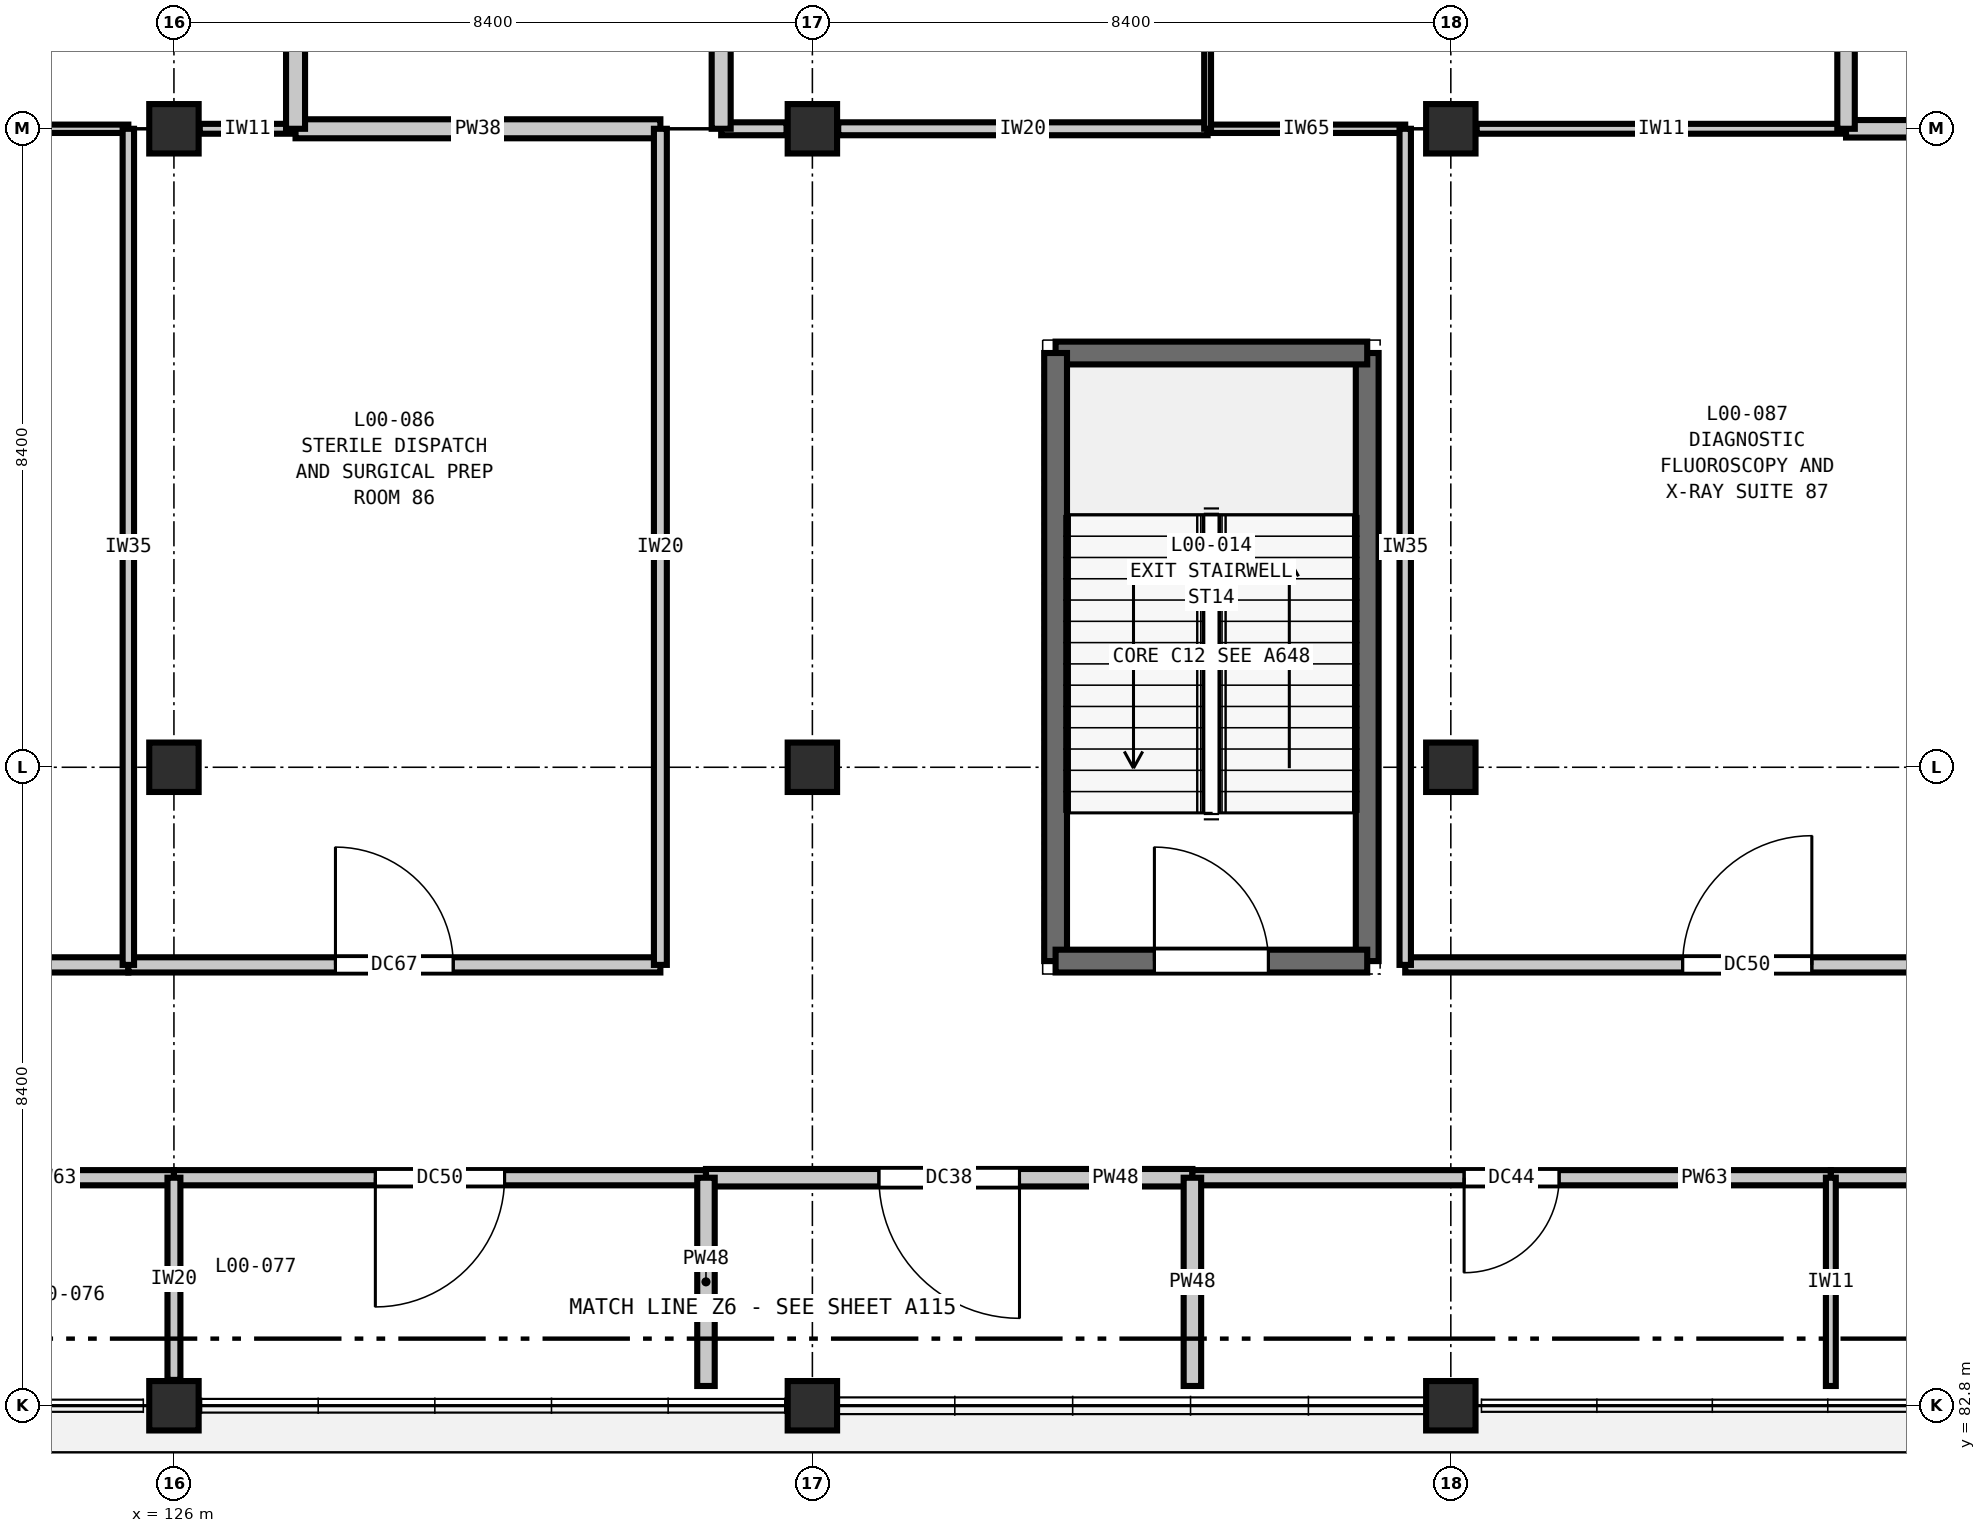
"""IFC4 building model, lengths in metres.
Left out: names, types, materials, properties, quantities, classifications, styles, units other than length and angle.
Written with IfcOpenShell. Run it as: python <this file> out.ifc"""

import sys

from ifc_helpers import new_model, si_unit, direction, frame, frame_2d, origin, origin_2d, place, context, subcontext, project, spatial, rectangle, extrude, element, fill, save


model = new_model("IFC4")
c1 = context("Model", 3, precision=1e-05, world=origin(), true_north=direction((0.0, 1.0)))
c2 = subcontext(c1, "Body", "Model", "MODEL_VIEW")
j1 = project(units=[si_unit("LENGTHUNIT", "METRE"), si_unit("PLANEANGLEUNIT", "RADIAN")], contexts=[c1])
p1 = place(None, origin())
s1 = spatial("IfcSite", under=j1, at=p1, CompositionType="ELEMENT")
p2 = place(p1, origin())
s2 = spatial("IfcBuilding", under=s1, at=p2, CompositionType="ELEMENT")
p3 = place(p2, origin())
s3 = spatial("IfcBuildingStorey", under=s2, at=p3, CompositionType="ELEMENT", Elevation=0.0)
for number, where, z_axis, x_axis in (
    (1, (126.0, 82.8, 0.0), (0.0, 0.0, 1.0), (1.0, 0.0, 0.0)),
    (2, (126.0, 91.2, 0.0), (0.0, 0.0, 1.0), (1.0, 0.0, 0.0)),
    (3, (126.0, 99.6, 0.0), (0.0, 0.0, 1.0), (1.0, 0.0, 0.0)),
    (4, (134.4, 82.8, 0.0), (0.0, 0.0, 1.0), (1.0, 0.0, 0.0)),
    (5, (134.4, 91.2, 0.0), (0.0, 0.0, 1.0), (1.0, 0.0, 0.0)),
    (6, (134.4, 99.6, 0.0), (0.0, 0.0, 1.0), (1.0, 0.0, 0.0)),
    (7, (142.8, 82.8, 0.0), (0.0, 0.0, 1.0), (1.0, 0.0, 0.0)),
    (8, (142.8, 91.2, 0.0), (0.0, 0.0, 1.0), (1.0, 0.0, 0.0)),
    (9, (142.8, 99.6, 0.0), (0.0, 0.0, 1.0), (1.0, 0.0, 0.0)),
):
    element("IfcColumn", number, at=place(p3, frame(where, z_axis=z_axis, x_axis=x_axis)), inside=s3, PredefinedType="COLUMN", context=c2, shape_type="SweptSolid", body=[
        extrude(rectangle(XDim=0.65, YDim=0.65, at=origin_2d()), origin(), (0.0, 0.0, 1.0), 5.4),
    ])
p4 = place(p3, frame((141.7, 88.65, 0.0), z_axis=(0.0, 0.0, 1.0), x_axis=(0.0, 1.0, 0.0)))
e10 = element("IfcWall", 10, at=p4, inside=s3, PredefinedType="SHEAR", context=c2, shape_type="SweptSolid", body=[
    extrude(rectangle(XDim=8.0, YDim=0.3, at=frame_2d((4.0, 0.0))), origin(), (0.0, 0.0, 1.0), 5.4),
])
p5 = place(p3, frame((141.7, 96.65, 0.0), z_axis=(0.0, 0.0, 1.0), x_axis=(-1.0, 0.0, 0.0)))
e11 = element("IfcWall", 11, at=p5, inside=s3, PredefinedType="SHEAR", context=c2, shape_type="SweptSolid", body=[
    extrude(rectangle(XDim=4.1, YDim=0.3, at=frame_2d((2.05, 0.0))), origin(), (0.0, 0.0, 1.0), 5.4),
])
p6 = place(p3, frame((137.6, 96.65, 0.0), z_axis=(0.0, 0.0, 1.0), x_axis=(0.0, -1.0, 0.0)))
e12 = element("IfcWall", 12, at=p6, inside=s3, PredefinedType="SHEAR", context=c2, shape_type="SweptSolid", body=[
    extrude(rectangle(XDim=8.0, YDim=0.3, at=frame_2d((4.0, 0.0))), origin(), (0.0, 0.0, 1.0), 5.4),
])
p7 = place(p3, frame((137.6, 88.65, 0.0), z_axis=(0.0, 0.0, 1.0), x_axis=(1.0, 0.0, 0.0)))
e13 = element("IfcWall", 13, at=p7, inside=s3, PredefinedType="SHEAR", context=c2, shape_type="SweptSolid", body=[
    extrude(rectangle(XDim=4.1, YDim=0.3, at=frame_2d((2.05, 0.0))), origin(), (0.0, 0.0, 1.0), 5.4),
])
p8 = place(p7, frame((1.3, 0.0, 0.0)))
e14 = element("IfcOpeningElement", 14, at=p8, cuts=e13, PredefinedType="OPENING", context=c2, shape_type="SweptSolid", body=[
    extrude(rectangle(XDim=1.5, YDim=2.2, at=frame_2d((0.75, 1.1))), frame((0.0, 0.16, 0.0), z_axis=(0.0, -1.0, 0.0), x_axis=(1.0, 0.0, 0.0)), (0.0, 0.0, 1.0), 0.32),
])
p9 = place(p3, frame((117.6, 85.8, 0.0), z_axis=(0.0, 0.0, 1.0), x_axis=(1.0, 0.0, 0.0)))
e15 = element("IfcWall", 15, at=p9, inside=s3, PredefinedType="PARTITIONING", context=c2, shape_type="SweptSolid", body=[
    extrude(rectangle(XDim=8.4, YDim=0.2, at=frame_2d((4.2, 0.0))), origin(), (0.0, 0.0, 1.0), 5.04),
])
p10 = place(p9, frame((3.425, 0.0, 0.0)))
e16 = element("IfcOpeningElement", 16, at=p10, cuts=e15, PredefinedType="OPENING", context=c2, shape_type="SweptSolid", body=[
    extrude(rectangle(XDim=1.55, YDim=2.25, at=frame_2d((0.775, 1.125))), frame((0.0, 0.11, 0.0), z_axis=(0.0, -1.0, 0.0), x_axis=(1.0, 0.0, 0.0)), (0.0, 0.0, 1.0), 0.22),
])
p11 = place(p3, frame((126.0, 85.8, 0.0), z_axis=(0.0, 0.0, 1.0), x_axis=(1.0, 0.0, 0.0)))
e17 = element("IfcWall", 17, at=p11, inside=s3, PredefinedType="PARTITIONING", context=c2, shape_type="SweptSolid", body=[
    extrude(rectangle(XDim=7.0, YDim=0.2, at=frame_2d((3.5, 0.0))), origin(), (0.0, 0.0, 1.0), 5.04),
])
p12 = place(p11, frame((2.65, 0.0, 0.0)))
e18 = element("IfcOpeningElement", 18, at=p12, cuts=e17, PredefinedType="OPENING", context=c2, shape_type="SweptSolid", body=[
    extrude(rectangle(XDim=1.7, YDim=2.3, at=frame_2d((0.85, 1.15))), frame((0.0, 0.11, 0.0), z_axis=(0.0, -1.0, 0.0), x_axis=(1.0, 0.0, 0.0)), (0.0, 0.0, 1.0), 0.22),
])
p13 = place(p3, frame((133.0, 85.8, 0.0), z_axis=(0.0, 0.0, 1.0), x_axis=(1.0, 0.0, 0.0)))
e19 = element("IfcWall", 19, at=p13, inside=s3, PredefinedType="PARTITIONING", context=c2, shape_type="SweptSolid", body=[
    extrude(rectangle(XDim=6.4, YDim=0.23, at=frame_2d((3.2, 0.0))), origin(), (0.0, 0.0, 1.0), 5.04),
])
p14 = place(p13, frame((2.275, 0.0, 0.0)))
e20 = element("IfcOpeningElement", 20, at=p14, cuts=e19, PredefinedType="OPENING", context=c2, shape_type="SweptSolid", body=[
    extrude(rectangle(XDim=1.85, YDim=2.3, at=frame_2d((0.925, 1.15))), frame((0.0, 0.125, 0.0), z_axis=(0.0, -1.0, 0.0), x_axis=(1.0, 0.0, 0.0)), (0.0, 0.0, 1.0), 0.25),
])
p15 = place(p3, frame((139.4, 85.8, 0.0), z_axis=(0.0, 0.0, 1.0), x_axis=(1.0, 0.0, 0.0)))
e21 = element("IfcWall", 21, at=p15, inside=s3, PredefinedType="PARTITIONING", context=c2, shape_type="SweptSolid", body=[
    extrude(rectangle(XDim=8.4, YDim=0.2, at=frame_2d((4.2, 0.0))), origin(), (0.0, 0.0, 1.0), 5.04),
])
p16 = place(p15, frame((3.575, 0.0, 0.0)))
e22 = element("IfcOpeningElement", 22, at=p16, cuts=e21, PredefinedType="OPENING", context=c2, shape_type="SweptSolid", body=[
    extrude(rectangle(XDim=1.25, YDim=2.15, at=frame_2d((0.625, 1.075))), frame((0.0, 0.11, 0.0), z_axis=(0.0, -1.0, 0.0), x_axis=(1.0, 0.0, 0.0)), (0.0, 0.0, 1.0), 0.22),
])
p17 = place(p3, frame((147.8, 85.8, 0.0), z_axis=(0.0, 0.0, 1.0), x_axis=(1.0, 0.0, 0.0)))
e23 = element("IfcWall", 23, at=p17, inside=s3, PredefinedType="PARTITIONING", context=c2, shape_type="SweptSolid", body=[
    extrude(rectangle(XDim=3.4, YDim=0.2, at=frame_2d((1.7, 0.0))), origin(), (0.0, 0.0, 1.0), 5.04),
])
p18 = place(p17, frame((1.05, 0.0, 0.0)))
e24 = element("IfcOpeningElement", 24, at=p18, cuts=e23, PredefinedType="OPENING", context=c2, shape_type="SweptSolid", body=[
    extrude(rectangle(XDim=1.3, YDim=2.2, at=frame_2d((0.65, 1.1))), frame((0.0, 0.11, 0.0), z_axis=(0.0, -1.0, 0.0), x_axis=(1.0, 0.0, 0.0)), (0.0, 0.0, 1.0), 0.22),
])
p19 = place(p3, frame((117.135, 88.6, 0.0), z_axis=(0.0, 0.0, 1.0), x_axis=(1.0, 0.0, 0.0)))
e25 = element("IfcWall", 25, at=p19, inside=s3, PredefinedType="PARTITIONING", context=c2, shape_type="SweptSolid", body=[
    extrude(rectangle(XDim=8.265, YDim=0.2, at=frame_2d((4.133, 0.0))), origin(), (0.0, 0.0, 1.0), 5.04),
])
p20 = place(p19, frame((3.408, 0.0, 0.0)))
e26 = element("IfcOpeningElement", 26, at=p20, cuts=e25, PredefinedType="OPENING", context=c2, shape_type="SweptSolid", body=[
    extrude(rectangle(XDim=1.45, YDim=2.25, at=frame_2d((0.725, 1.125))), frame((0.0, 0.11, 0.0), z_axis=(0.0, -1.0, 0.0), x_axis=(1.0, 0.0, 0.0)), (0.0, 0.0, 1.0), 0.22),
])
p21 = place(p3, frame((125.4, 88.6, 0.0), z_axis=(0.0, 0.0, 1.0), x_axis=(1.0, 0.0, 0.0)))
e27 = element("IfcWall", 27, at=p21, inside=s3, PredefinedType="PARTITIONING", context=c2, shape_type="SweptSolid", body=[
    extrude(rectangle(XDim=7.0, YDim=0.2, at=frame_2d((3.5, 0.0))), origin(), (0.0, 0.0, 1.0), 5.04),
])
p22 = place(p21, frame((2.725, 0.0, 0.0)))
e28 = element("IfcOpeningElement", 28, at=p22, cuts=e27, PredefinedType="OPENING", context=c2, shape_type="SweptSolid", body=[
    extrude(rectangle(XDim=1.55, YDim=2.25, at=frame_2d((0.775, 1.125))), frame((0.0, 0.11, 0.0), z_axis=(0.0, -1.0, 0.0), x_axis=(1.0, 0.0, 0.0)), (0.0, 0.0, 1.0), 0.22),
])
p23 = place(p3, frame((142.2, 88.6, 0.0), z_axis=(0.0, 0.0, 1.0), x_axis=(1.0, 0.0, 0.0)))
e29 = element("IfcWall", 29, at=p23, inside=s3, PredefinedType="PARTITIONING", context=c2, shape_type="SweptSolid", body=[
    extrude(rectangle(XDim=9.0, YDim=0.2, at=frame_2d((4.5, 0.0))), origin(), (0.0, 0.0, 1.0), 5.04),
])
p24 = place(p23, frame((3.65, 0.0, 0.0)))
e30 = element("IfcOpeningElement", 30, at=p24, cuts=e29, PredefinedType="OPENING", context=c2, shape_type="SweptSolid", body=[
    extrude(rectangle(XDim=1.7, YDim=2.3, at=frame_2d((0.85, 1.15))), frame((0.0, 0.11, 0.0), z_axis=(0.0, -1.0, 0.0), x_axis=(1.0, 0.0, 0.0)), (0.0, 0.0, 1.0), 0.22),
])
p25 = place(p3, frame((119.2, 99.6, 0.0), z_axis=(0.0, 0.0, 1.0), x_axis=(1.0, 0.0, 0.0)))
e31 = element("IfcWall", 31, at=p25, inside=s3, PredefinedType="PARTITIONING", context=c2, shape_type="SweptSolid", body=[
    extrude(rectangle(XDim=6.2, YDim=0.11, at=frame_2d((3.1, 0.0))), origin(), (0.0, 0.0, 1.0), 4.635),
])
p26 = place(p3, frame((126.34, 99.6, 0.0), z_axis=(0.0, 0.0, 1.0), x_axis=(1.0, 0.0, 0.0)))
e32 = element("IfcWall", 32, at=p26, inside=s3, PredefinedType="PARTITIONING", context=c2, shape_type="SweptSolid", body=[
    extrude(rectangle(XDim=1.26, YDim=0.13, at=frame_2d((0.63, 0.0))), origin(), (0.0, 0.0, 1.0), 4.635),
])
p27 = place(p3, frame((127.6, 99.6, 0.0), z_axis=(0.0, 0.0, 1.0), x_axis=(1.0, 0.0, 0.0)))
e33 = element("IfcWall", 33, at=p27, inside=s3, PredefinedType="PARTITIONING", context=c2, shape_type="SweptSolid", body=[
    extrude(rectangle(XDim=4.8, YDim=0.25, at=frame_2d((2.4, 0.0))), origin(), (0.0, 0.0, 1.0), 4.635),
])
p28 = place(p3, frame((134.74, 99.6, 0.0), z_axis=(0.0, 0.0, 1.0), x_axis=(1.0, 0.0, 0.0)))
e34 = element("IfcWall", 34, at=p28, inside=s3, PredefinedType="PARTITIONING", context=c2, shape_type="SweptSolid", body=[
    extrude(rectangle(XDim=4.86, YDim=0.17, at=frame_2d((2.43, 0.0))), origin(), (0.0, 0.0, 1.0), 4.635),
])
p29 = place(p3, frame((133.2, 99.6, 0.0), z_axis=(0.0, 0.0, 1.0), x_axis=(1.0, 0.0, 0.0)))
e35 = element("IfcWall", 35, at=p29, inside=s3, PredefinedType="PARTITIONING", context=c2, shape_type="SweptSolid", body=[
    extrude(rectangle(XDim=0.86, YDim=0.17, at=frame_2d((0.43, 0.0))), origin(), (0.0, 0.0, 1.0), 4.635),
])
p30 = place(p3, frame((139.6, 99.6, 0.0), z_axis=(0.0, 0.0, 1.0), x_axis=(1.0, 0.0, 0.0)))
e36 = element("IfcWall", 36, at=p30, inside=s3, PredefinedType="PARTITIONING", context=c2, shape_type="SweptSolid", body=[
    extrude(rectangle(XDim=2.6, YDim=0.11, at=frame_2d((1.3, 0.0))), origin(), (0.0, 0.0, 1.0), 4.635),
])
p31 = place(p3, frame((143.14, 99.6, 0.0), z_axis=(0.0, 0.0, 1.0), x_axis=(1.0, 0.0, 0.0)))
e37 = element("IfcWall", 37, at=p31, inside=s3, PredefinedType="PARTITIONING", context=c2, shape_type="SweptSolid", body=[
    extrude(rectangle(XDim=4.86, YDim=0.13, at=frame_2d((2.43, 0.0))), origin(), (0.0, 0.0, 1.0), 4.635),
])
p32 = place(p3, frame((148.0, 99.6, 0.0), z_axis=(0.0, 0.0, 1.0), x_axis=(1.0, 0.0, 0.0)))
e38 = element("IfcWall", 38, at=p32, inside=s3, PredefinedType="PARTITIONING", context=c2, shape_type="SweptSolid", body=[
    extrude(rectangle(XDim=2.86, YDim=0.23, at=frame_2d((1.43, 0.0))), origin(), (0.0, 0.0, 1.0), 4.635),
])
p33 = place(p3, frame((125.4, 88.6, 0.0), z_axis=(0.0, 0.0, 1.0), x_axis=(0.0, 1.0, 0.0)))
e39 = element("IfcWall", 39, at=p33, inside=s3, PredefinedType="PARTITIONING", context=c2, shape_type="SweptSolid", body=[
    extrude(rectangle(XDim=11.0, YDim=0.15, at=frame_2d((5.5, 0.0))), origin(), (0.0, 0.0, 1.0), 5.04),
])
p34 = place(p3, frame((126.0, 83.14, 0.0), z_axis=(0.0, 0.0, 1.0), x_axis=(0.0, 1.0, 0.0)))
e40 = element("IfcWall", 40, at=p34, inside=s3, PredefinedType="PARTITIONING", context=c2, shape_type="SweptSolid", body=[
    extrude(rectangle(XDim=2.66, YDim=0.17, at=frame_2d((1.33, 0.0))), origin(), (0.0, 0.0, 1.0), 4.685),
])
p35 = place(p3, frame((127.6, 99.6, 0.0), z_axis=(0.0, 0.0, 1.0), x_axis=(0.0, 1.0, 0.0)))
e41 = element("IfcWall", 41, at=p35, inside=s3, PredefinedType="PARTITIONING", context=c2, shape_type="SweptSolid", body=[
    extrude(rectangle(XDim=13.6, YDim=0.25, at=frame_2d((6.8, 0.0))), origin(), (0.0, 0.0, 1.0), 5.04),
])
p36 = place(p3, frame((132.4, 88.6, 0.0), z_axis=(0.0, 0.0, 1.0), x_axis=(0.0, 1.0, 0.0)))
e42 = element("IfcWall", 42, at=p36, inside=s3, PredefinedType="PARTITIONING", context=c2, shape_type="SweptSolid", body=[
    extrude(rectangle(XDim=11.0, YDim=0.17, at=frame_2d((5.5, 0.0))), origin(), (0.0, 0.0, 1.0), 5.04),
])
p37 = place(p3, frame((133.0, 83.06, 0.0), z_axis=(0.0, 0.0, 1.0), x_axis=(0.0, 1.0, 0.0)))
e43 = element("IfcWall", 43, at=p37, inside=s3, PredefinedType="PARTITIONING", context=c2, shape_type="SweptSolid", body=[
    extrude(rectangle(XDim=2.74, YDim=0.23, at=frame_2d((1.37, 0.0))), origin(), (0.0, 0.0, 1.0), 5.04),
])
p38 = place(p3, frame((133.2, 99.6, 0.0), z_axis=(0.0, 0.0, 1.0), x_axis=(0.0, 1.0, 0.0)))
e44 = element("IfcWall", 44, at=p38, inside=s3, PredefinedType="PARTITIONING", context=c2, shape_type="SweptSolid", body=[
    extrude(rectangle(XDim=13.6, YDim=0.25, at=frame_2d((6.8, 0.0))), origin(), (0.0, 0.0, 1.0), 5.04),
])
p39 = place(p3, frame((139.4, 83.06, 0.0), z_axis=(0.0, 0.0, 1.0), x_axis=(0.0, 1.0, 0.0)))
e45 = element("IfcWall", 45, at=p39, inside=s3, PredefinedType="PARTITIONING", context=c2, shape_type="SweptSolid", body=[
    extrude(rectangle(XDim=2.74, YDim=0.23, at=frame_2d((1.37, 0.0))), origin(), (0.0, 0.0, 1.0), 5.04),
])
p40 = place(p3, frame((139.6, 99.6, 0.0), z_axis=(0.0, 0.0, 1.0), x_axis=(0.0, 1.0, 0.0)))
e46 = element("IfcWall", 46, at=p40, inside=s3, PredefinedType="PARTITIONING", context=c2, shape_type="SweptSolid", body=[
    extrude(rectangle(XDim=13.6, YDim=0.09, at=frame_2d((6.8, 0.0))), origin(), (0.0, 0.0, 1.0), 5.04),
])
p41 = place(p3, frame((142.2, 88.6, 0.0), z_axis=(0.0, 0.0, 1.0), x_axis=(0.0, 1.0, 0.0)))
e47 = element("IfcWall", 47, at=p41, inside=s3, PredefinedType="PARTITIONING", context=c2, shape_type="SweptSolid", body=[
    extrude(rectangle(XDim=11.0, YDim=0.15, at=frame_2d((5.5, 0.0))), origin(), (0.0, 0.0, 1.0), 5.04),
])
p42 = place(p3, frame((147.8, 83.06, 0.0), z_axis=(0.0, 0.0, 1.0), x_axis=(0.0, 1.0, 0.0)))
e48 = element("IfcWall", 48, at=p42, inside=s3, PredefinedType="PARTITIONING", context=c2, shape_type="SweptSolid", body=[
    extrude(rectangle(XDim=2.74, YDim=0.13, at=frame_2d((1.37, 0.0))), origin(), (0.0, 0.0, 1.0), 5.04),
])
p43 = place(p3, frame((148.0, 99.6, 0.0), z_axis=(0.0, 0.0, 1.0), x_axis=(0.0, 1.0, 0.0)))
e49 = element("IfcWall", 49, at=p43, inside=s3, PredefinedType="PARTITIONING", context=c2, shape_type="SweptSolid", body=[
    extrude(rectangle(XDim=13.6, YDim=0.23, at=frame_2d((6.8, 0.0))), origin(), (0.0, 0.0, 1.0), 5.04),
])
p44 = place(p8, origin())
e50 = element("IfcDoor", 50, at=p44, inside=s3, OperationType="SINGLE_SWING_LEFT", PredefinedType="DOOR", context=c2, shape_type="SweptSolid", body=[
    extrude(rectangle(XDim=1.5, YDim=2.2, at=frame_2d((0.75, 1.1))), frame((0.0, 0.025, 0.0), z_axis=(0.0, -1.0, 0.0), x_axis=(1.0, 0.0, 0.0)), (0.0, 0.0, 1.0), 0.05),
])
fill(e14, e50)
p45 = place(p12, frame((1.7, 0.0, 0.0), z_axis=(0.0, 0.0, 1.0), x_axis=(-1.0, 0.0, 0.0)))
e51 = element("IfcDoor", 51, at=p45, inside=s3, OperationType="SINGLE_SWING_RIGHT", PredefinedType="DOOR", context=c2, shape_type="SweptSolid", body=[
    extrude(rectangle(XDim=1.7, YDim=2.3, at=frame_2d((0.85, 1.15))), frame((0.0, 0.025, 0.0), z_axis=(0.0, -1.0, 0.0), x_axis=(1.0, 0.0, 0.0)), (0.0, 0.0, 1.0), 0.05),
])
fill(e18, e51)
p46 = place(p14, frame((1.85, 0.0, 0.0), z_axis=(0.0, 0.0, 1.0), x_axis=(-1.0, 0.0, 0.0)))
e52 = element("IfcDoor", 52, at=p46, inside=s3, OperationType="SINGLE_SWING_LEFT", PredefinedType="DOOR", context=c2, shape_type="SweptSolid", body=[
    extrude(rectangle(XDim=1.85, YDim=2.3, at=frame_2d((0.925, 1.15))), frame((0.0, 0.025, 0.0), z_axis=(0.0, -1.0, 0.0), x_axis=(1.0, 0.0, 0.0)), (0.0, 0.0, 1.0), 0.05),
])
fill(e20, e52)
p47 = place(p16, frame((1.25, 0.0, 0.0), z_axis=(0.0, 0.0, 1.0), x_axis=(-1.0, 0.0, 0.0)))
e53 = element("IfcDoor", 53, at=p47, inside=s3, OperationType="SINGLE_SWING_RIGHT", PredefinedType="DOOR", context=c2, shape_type="SweptSolid", body=[
    extrude(rectangle(XDim=1.25, YDim=2.15, at=frame_2d((0.625, 1.075))), frame((0.0, 0.025, 0.0), z_axis=(0.0, -1.0, 0.0), x_axis=(1.0, 0.0, 0.0)), (0.0, 0.0, 1.0), 0.05),
])
fill(e22, e53)
p48 = place(p22, origin())
e54 = element("IfcDoor", 54, at=p48, inside=s3, OperationType="SINGLE_SWING_LEFT", PredefinedType="DOOR", context=c2, shape_type="SweptSolid", body=[
    extrude(rectangle(XDim=1.55, YDim=2.25, at=frame_2d((0.775, 1.125))), frame((0.0, 0.025, 0.0), z_axis=(0.0, -1.0, 0.0), x_axis=(1.0, 0.0, 0.0)), (0.0, 0.0, 1.0), 0.05),
])
fill(e28, e54)
p49 = place(p24, origin())
e55 = element("IfcDoor", 55, at=p49, inside=s3, OperationType="SINGLE_SWING_RIGHT", PredefinedType="DOOR", context=c2, shape_type="SweptSolid", body=[
    extrude(rectangle(XDim=1.7, YDim=2.3, at=frame_2d((0.85, 1.15))), frame((0.0, 0.025, 0.0), z_axis=(0.0, -1.0, 0.0), x_axis=(1.0, 0.0, 0.0)), (0.0, 0.0, 1.0), 0.05),
])
fill(e30, e55)
save(model, sys.argv[1])
